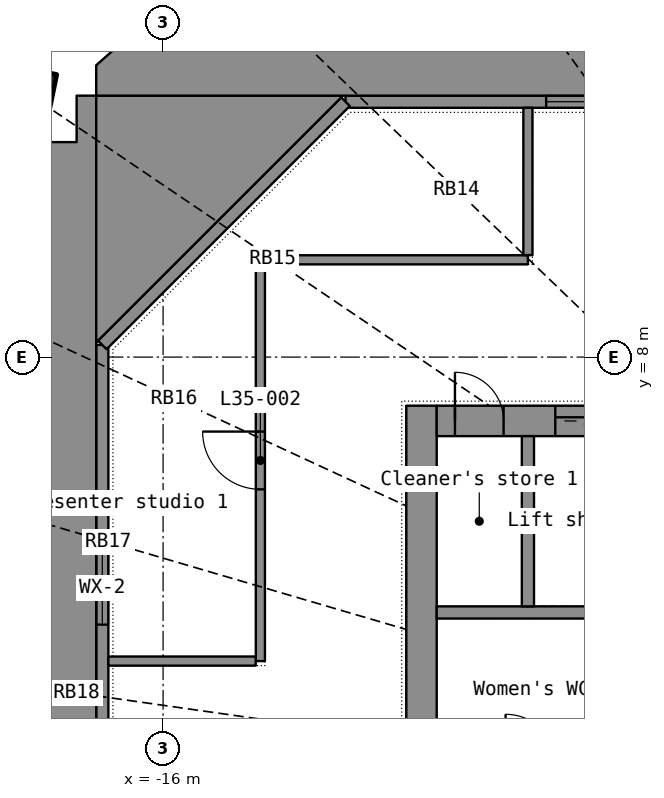
"""IFC4 building model, lengths in metres.
Left out: names, types, materials, properties, quantities, classifications, styles, units other than length and angle.
Written with IfcOpenShell. Run it as: python <this file> out.ifc"""

import sys

from ifc_helpers import new_model, si_unit, direction, frame, frame_2d, origin, origin_2d, place, context, subcontext, project, spatial, polyline, rectangle, hollow_rectangle, outline, extrude, element, fill, save


model = new_model("IFC4")
c1 = context("Model", 3, precision=1e-05, world=origin(), true_north=direction((0.0, 1.0)))
c2 = subcontext(c1, "Body", "Model", "MODEL_VIEW")
j1 = project(units=[si_unit("LENGTHUNIT", "METRE"), si_unit("PLANEANGLEUNIT", "RADIAN")], contexts=[c1])
p1 = place(None, origin())
s1 = spatial("IfcSite", under=j1, at=p1, CompositionType="ELEMENT")
p2 = place(p1, origin())
s2 = spatial("IfcBuilding", under=s1, at=p2, CompositionType="ELEMENT")
p3 = place(p2, frame((0.0, 0.0, 145.2)))
s3 = spatial("IfcBuildingStorey", under=s2, at=p3, CompositionType="ELEMENT", Elevation=145.2)
p4 = place(p3, frame((-18.222, 12.336, 0.0), z_axis=(0.026511305, -0.018201791, 0.999482789), x_axis=(0.720044306, 0.693898, -0.00646247)))
e1 = element("IfcColumn", 1, at=p4, inside=s3, PredefinedType="COLUMN", context=c2, shape_type="SweptSolid", body=[
    extrude(hollow_rectangle(XDim=0.8, YDim=0.8, WallThickness=0.025, at=origin_2d()), origin(), (0.0, 0.0, 1.0), 7.404),
])
p5 = place(p3, frame((-13.0, 12.2, 0.08), z_axis=(0.0, 0.0, 1.0), x_axis=(1.0, 0.0, 0.0)))
e2 = element("IfcWall", 2, at=p5, inside=s3, PredefinedType="STANDARD", context=c2, shape_type="SweptSolid", body=[
    extrude(rectangle(XDim=26.0, YDim=0.2, at=frame_2d((13.0, 0.0))), origin(), (0.0, 0.0, 1.0), 7.12),
])
p6 = place(p5, frame((7.1, 0.0, 0.0)))
e3 = element("IfcOpeningElement", 3, at=p6, cuts=e2, PredefinedType="OPENING", context=c2, shape_type="SweptSolid", body=[
    extrude(rectangle(XDim=1.8, YDim=2.4, at=frame_2d((0.9, 1.2))), frame((0.0, 0.11, 0.0), z_axis=(0.0, -1.0, 0.0), x_axis=(1.0, 0.0, 0.0)), (0.0, 0.0, 1.0), 0.22),
])
p7 = place(p5, frame((17.1, 0.0, 0.0)))
e4 = element("IfcOpeningElement", 4, at=p7, cuts=e2, PredefinedType="OPENING", context=c2, shape_type="SweptSolid", body=[
    extrude(rectangle(XDim=1.8, YDim=2.4, at=frame_2d((0.9, 1.2))), frame((0.0, 0.11, 0.0), z_axis=(0.0, -1.0, 0.0), x_axis=(1.0, 0.0, 0.0)), (0.0, 0.0, 1.0), 0.22),
])
p8 = place(p5, frame((3.3, 0.0, 0.9)))
e5 = element("IfcOpeningElement", 5, at=p8, cuts=e2, PredefinedType="OPENING", context=c2, shape_type="SweptSolid", body=[
    extrude(rectangle(XDim=2.4, YDim=1.5, at=frame_2d((1.2, 0.75))), frame((0.0, 0.11, 0.0), z_axis=(0.0, -1.0, 0.0), x_axis=(1.0, 0.0, 0.0)), (0.0, 0.0, 1.0), 0.22),
])
p9 = place(p5, frame((11.8, 0.0, 0.9)))
e6 = element("IfcOpeningElement", 6, at=p9, cuts=e2, PredefinedType="OPENING", context=c2, shape_type="SweptSolid", body=[
    extrude(rectangle(XDim=2.4, YDim=1.5, at=frame_2d((1.2, 0.75))), frame((0.0, 0.11, 0.0), z_axis=(0.0, -1.0, 0.0), x_axis=(1.0, 0.0, 0.0)), (0.0, 0.0, 1.0), 0.22),
])
p10 = place(p5, frame((20.3, 0.0, 0.9)))
e7 = element("IfcOpeningElement", 7, at=p10, cuts=e2, PredefinedType="OPENING", context=c2, shape_type="SweptSolid", body=[
    extrude(rectangle(XDim=2.4, YDim=1.5, at=frame_2d((1.2, 0.75))), frame((0.0, 0.11, 0.0), z_axis=(0.0, -1.0, 0.0), x_axis=(1.0, 0.0, 0.0)), (0.0, 0.0, 1.0), 0.22),
])
p11 = place(p5, frame((6.5, 0.0, 3.2)))
e8 = element("IfcOpeningElement", 8, at=p11, cuts=e2, PredefinedType="OPENING", context=c2, shape_type="SweptSolid", body=[
    extrude(rectangle(XDim=3.0, YDim=1.0, at=frame_2d((1.5, 0.5))), frame((0.0, 0.11, 0.0), z_axis=(0.0, -1.0, 0.0), x_axis=(1.0, 0.0, 0.0)), (0.0, 0.0, 1.0), 0.22),
])
p12 = place(p5, frame((16.5, 0.0, 3.2)))
e9 = element("IfcOpeningElement", 9, at=p12, cuts=e2, PredefinedType="OPENING", context=c2, shape_type="SweptSolid", body=[
    extrude(rectangle(XDim=3.0, YDim=1.0, at=frame_2d((1.5, 0.5))), frame((0.0, 0.11, 0.0), z_axis=(0.0, -1.0, 0.0), x_axis=(1.0, 0.0, 0.0)), (0.0, 0.0, 1.0), 0.22),
])
p13 = place(p3, frame((-17.0, -8.2, 0.08), z_axis=(0.0, 0.0, 1.0), x_axis=(0.0, 1.0, 0.0)))
e10 = element("IfcWall", 10, at=p13, inside=s3, PredefinedType="STANDARD", context=c2, shape_type="SweptSolid", body=[
    extrude(rectangle(XDim=16.4, YDim=0.2, at=frame_2d((8.2, 0.0))), origin(), (0.0, 0.0, 1.0), 7.12),
])
p14 = place(p13, frame((7.3, 0.0, 0.0)))
e11 = element("IfcOpeningElement", 11, at=p14, cuts=e10, PredefinedType="OPENING", context=c2, shape_type="SweptSolid", body=[
    extrude(rectangle(XDim=1.8, YDim=2.4, at=frame_2d((0.9, 1.2))), frame((0.0, 0.11, 0.0), z_axis=(0.0, -1.0, 0.0), x_axis=(1.0, 0.0, 0.0)), (0.0, 0.0, 1.0), 0.22),
])
p15 = place(p13, frame((3.4, 0.0, 0.1)))
e12 = element("IfcOpeningElement", 12, at=p15, cuts=e10, PredefinedType="OPENING", context=c2, shape_type="SweptSolid", body=[
    extrude(rectangle(XDim=1.2, YDim=2.2, at=frame_2d((0.6, 1.1))), frame((0.0, 0.11, 0.0), z_axis=(0.0, -1.0, 0.0), x_axis=(1.0, 0.0, 0.0)), (0.0, 0.0, 1.0), 0.22),
])
p16 = place(p13, frame((11.8, 0.0, 0.1)))
e13 = element("IfcOpeningElement", 13, at=p16, cuts=e10, PredefinedType="OPENING", context=c2, shape_type="SweptSolid", body=[
    extrude(rectangle(XDim=1.2, YDim=2.2, at=frame_2d((0.6, 1.1))), frame((0.0, 0.11, 0.0), z_axis=(0.0, -1.0, 0.0), x_axis=(1.0, 0.0, 0.0)), (0.0, 0.0, 1.0), 0.22),
])
p17 = place(p3, frame((-17.0, 8.2, 0.08), z_axis=(0.0, 0.0, 1.0), x_axis=(0.707106781, 0.707106781, 0.0)))
e14 = element("IfcWall", 14, at=p17, inside=s3, PredefinedType="STANDARD", context=c2, shape_type="SweptSolid", body=[
    extrude(rectangle(XDim=5.657, YDim=0.2, at=frame_2d((2.828, 0.0))), origin(), (0.0, 0.0, 1.0), 7.12),
])
p18 = place(p3, frame((0.0, 0.0, -0.4)))
e15 = element("IfcWall", 15, at=p18, inside=s3, PredefinedType="ELEMENTEDWALL", context=c2, shape_type="SweptSolid", body=[
    extrude(outline(polyline([(-23.072, 2.519), (-23.214, 1.646), (-23.248, 1.025), (-22.392, 1.025), (-22.392, 0.9), (-17.1, 0.9), (-17.1, 8.241), (-17.1, 12.3), (-17.422, 12.3), (-17.422, 11.536), (-18.419, 11.536), (-19.088, 10.829), (-19.4, 10.432), (-19.308, 10.432), (-19.308, 8.382), (-20.86, 8.382), (-21.119, 7.979), (-21.507, 7.221), (-21.507, 5.744), (-22.175, 5.744), (-22.509, 4.886), (-22.719, 4.119), (-22.562, 4.119), (-22.562, 2.519), (-23.072, 2.519)])), origin(), (0.0, 0.0, 1.0), 1.58),
])
p19 = place(p3, frame((0.0, 0.0, -0.4)))
e16 = element("IfcWall", 16, at=p19, inside=s3, PredefinedType="ELEMENTEDWALL", context=c2, shape_type="SweptSolid", body=[
    extrude(outline(polyline([(-13.042, 12.3), (-17.1, 12.3), (-17.1, 8.241), (-13.042, 12.3)])), origin(), (0.0, 0.0, 1.0), 1.58),
])
p20 = place(p3, frame((0.0, 0.0, -0.4)))
e17 = element("IfcWall", 17, at=p20, inside=s3, PredefinedType="ELEMENTEDWALL", context=c2, shape_type="SweptSolid", body=[
    extrude(outline(polyline([(-17.1, 12.8), (-17.1, 12.3), (-13.042, 12.3), (-5.9, 12.3), (-5.9, 18.26), (-6.031, 18.236), (-7.357, 17.898), (-7.357, 17.304), (-8.957, 17.304), (-8.957, 17.41), (-9.848, 17.111), (-10.763, 16.725), (-10.763, 15.372), (-12.813, 15.372), (-12.813, 15.75), (-13.366, 15.465), (-14.506, 14.757), (-14.506, 13.924), (-15.704, 13.924), (-16.478, 13.35), (-17.1, 12.8)])), origin(), (0.0, 0.0, 1.0), 1.58),
])
p21 = place(p3, frame((-11.75, -7.2, 0.0), z_axis=(0.0, 0.0, 1.0), x_axis=(0.0, 1.0, 0.0)))
e18 = element("IfcWall", 18, at=p21, inside=s3, PredefinedType="SHEAR", context=c2, shape_type="SweptSolid", body=[
    extrude(rectangle(XDim=14.4, YDim=0.5, at=frame_2d((7.2, 0.0))), origin(), (0.0, 0.0, 1.0), 7.0),
])
p22 = place(p21, frame((6.5, 0.0, 0.0)))
e19 = element("IfcOpeningElement", 19, at=p22, cuts=e18, PredefinedType="OPENING", context=c2, shape_type="SweptSolid", body=[
    extrude(rectangle(XDim=1.4, YDim=2.2, at=frame_2d((0.7, 1.1))), frame((0.0, 0.26, 0.0), z_axis=(0.0, -1.0, 0.0), x_axis=(1.0, 0.0, 0.0)), (0.0, 0.0, 1.0), 0.52),
])
p23 = place(p3, frame((-11.5, 6.95, 0.0), z_axis=(0.0, 0.0, 1.0), x_axis=(1.0, 0.0, 0.0)))
e20 = element("IfcWall", 20, at=p23, inside=s3, PredefinedType="SHEAR", context=c2, shape_type="SweptSolid", body=[
    extrude(rectangle(XDim=23.0, YDim=0.5, at=frame_2d((11.5, 0.0))), origin(), (0.0, 0.0, 1.0), 7.0),
])
p24 = place(p23, frame((1.95, 0.0, 0.0)))
e21 = element("IfcOpeningElement", 21, at=p24, cuts=e20, PredefinedType="OPENING", context=c2, shape_type="SweptSolid", body=[
    extrude(rectangle(XDim=1.1, YDim=2.2, at=frame_2d((0.55, 1.1))), frame((0.0, 0.26, 0.0), z_axis=(0.0, -1.0, 0.0), x_axis=(1.0, 0.0, 0.0)), (0.0, 0.0, 1.0), 0.52),
])
p25 = place(p23, frame((3.95, 0.0, 0.0)))
e22 = element("IfcOpeningElement", 22, at=p25, cuts=e20, PredefinedType="OPENING", context=c2, shape_type="SweptSolid", body=[
    extrude(rectangle(XDim=1.1, YDim=2.2, at=frame_2d((0.55, 1.1))), frame((0.0, 0.26, 0.0), z_axis=(0.0, -1.0, 0.0), x_axis=(1.0, 0.0, 0.0)), (0.0, 0.0, 1.0), 0.52),
])
p26 = place(p23, frame((5.95, 0.0, 0.0)))
e23 = element("IfcOpeningElement", 23, at=p26, cuts=e20, PredefinedType="OPENING", context=c2, shape_type="SweptSolid", body=[
    extrude(rectangle(XDim=1.1, YDim=2.2, at=frame_2d((0.55, 1.1))), frame((0.0, 0.26, 0.0), z_axis=(0.0, -1.0, 0.0), x_axis=(1.0, 0.0, 0.0)), (0.0, 0.0, 1.0), 0.52),
])
p27 = place(p23, frame((7.95, 0.0, 0.0)))
e24 = element("IfcOpeningElement", 24, at=p27, cuts=e20, PredefinedType="OPENING", context=c2, shape_type="SweptSolid", body=[
    extrude(rectangle(XDim=1.1, YDim=2.2, at=frame_2d((0.55, 1.1))), frame((0.0, 0.26, 0.0), z_axis=(0.0, -1.0, 0.0), x_axis=(1.0, 0.0, 0.0)), (0.0, 0.0, 1.0), 0.52),
])
p28 = place(p23, frame((9.95, 0.0, 0.0)))
e25 = element("IfcOpeningElement", 25, at=p28, cuts=e20, PredefinedType="OPENING", context=c2, shape_type="SweptSolid", body=[
    extrude(rectangle(XDim=1.1, YDim=2.2, at=frame_2d((0.55, 1.1))), frame((0.0, 0.26, 0.0), z_axis=(0.0, -1.0, 0.0), x_axis=(1.0, 0.0, 0.0)), (0.0, 0.0, 1.0), 0.52),
])
p29 = place(p23, frame((11.95, 0.0, 0.0)))
e26 = element("IfcOpeningElement", 26, at=p29, cuts=e20, PredefinedType="OPENING", context=c2, shape_type="SweptSolid", body=[
    extrude(rectangle(XDim=1.1, YDim=2.2, at=frame_2d((0.55, 1.1))), frame((0.0, 0.26, 0.0), z_axis=(0.0, -1.0, 0.0), x_axis=(1.0, 0.0, 0.0)), (0.0, 0.0, 1.0), 0.52),
])
p30 = place(p23, frame((13.95, 0.0, 0.0)))
e27 = element("IfcOpeningElement", 27, at=p30, cuts=e20, PredefinedType="OPENING", context=c2, shape_type="SweptSolid", body=[
    extrude(rectangle(XDim=1.1, YDim=2.2, at=frame_2d((0.55, 1.1))), frame((0.0, 0.26, 0.0), z_axis=(0.0, -1.0, 0.0), x_axis=(1.0, 0.0, 0.0)), (0.0, 0.0, 1.0), 0.52),
])
p31 = place(p23, frame((15.95, 0.0, 0.0)))
e28 = element("IfcOpeningElement", 28, at=p31, cuts=e20, PredefinedType="OPENING", context=c2, shape_type="SweptSolid", body=[
    extrude(rectangle(XDim=1.1, YDim=2.2, at=frame_2d((0.55, 1.1))), frame((0.0, 0.26, 0.0), z_axis=(0.0, -1.0, 0.0), x_axis=(1.0, 0.0, 0.0)), (0.0, 0.0, 1.0), 0.52),
])
p32 = place(p23, frame((17.95, 0.0, 0.0)))
e29 = element("IfcOpeningElement", 29, at=p32, cuts=e20, PredefinedType="OPENING", context=c2, shape_type="SweptSolid", body=[
    extrude(rectangle(XDim=1.1, YDim=2.2, at=frame_2d((0.55, 1.1))), frame((0.0, 0.26, 0.0), z_axis=(0.0, -1.0, 0.0), x_axis=(1.0, 0.0, 0.0)), (0.0, 0.0, 1.0), 0.52),
])
p33 = place(p23, frame((19.95, 0.0, 0.0)))
e30 = element("IfcOpeningElement", 30, at=p33, cuts=e20, PredefinedType="OPENING", context=c2, shape_type="SweptSolid", body=[
    extrude(rectangle(XDim=1.1, YDim=2.2, at=frame_2d((0.55, 1.1))), frame((0.0, 0.26, 0.0), z_axis=(0.0, -1.0, 0.0), x_axis=(1.0, 0.0, 0.0)), (0.0, 0.0, 1.0), 0.52),
])
p34 = place(p23, frame((0.3, 0.0, 0.0)))
e31 = element("IfcOpeningElement", 31, at=p34, cuts=e20, PredefinedType="OPENING", context=c2, shape_type="SweptSolid", body=[
    extrude(rectangle(XDim=0.8, YDim=2.05, at=frame_2d((0.4, 1.025))), frame((0.0, 0.26, 0.0), z_axis=(0.0, -1.0, 0.0), x_axis=(1.0, 0.0, 0.0)), (0.0, 0.0, 1.0), 0.52),
])
p35 = place(p23, frame((21.9, 0.0, 0.0)))
e32 = element("IfcOpeningElement", 32, at=p35, cuts=e20, PredefinedType="OPENING", context=c2, shape_type="SweptSolid", body=[
    extrude(rectangle(XDim=0.8, YDim=2.05, at=frame_2d((0.4, 1.025))), frame((0.0, 0.26, 0.0), z_axis=(0.0, -1.0, 0.0), x_axis=(1.0, 0.0, 0.0)), (0.0, 0.0, 1.0), 0.52),
])
p36 = place(p3, frame((-11.5, 3.8, 0.0), z_axis=(0.0, 0.0, 1.0), x_axis=(1.0, 0.0, 0.0)))
e33 = element("IfcWall", 33, at=p36, inside=s3, PredefinedType="SHEAR", context=c2, shape_type="SweptSolid", body=[
    extrude(rectangle(XDim=23.0, YDim=0.2, at=frame_2d((11.5, 0.0))), origin(), (0.0, 0.0, 1.0), 7.0),
])
p37 = place(p3, frame((-10.0, 3.9, 0.0), z_axis=(0.0, 0.0, 1.0), x_axis=(0.0, 1.0, 0.0)))
e34 = element("IfcWall", 34, at=p37, inside=s3, PredefinedType="SHEAR", context=c2, shape_type="SweptSolid", body=[
    extrude(rectangle(XDim=2.8, YDim=0.2, at=frame_2d((1.4, 0.0))), origin(), (0.0, 0.0, 1.0), 7.0),
])
p38 = place(p3, frame((-14.4, 3.0, 0.0), z_axis=(0.0, 0.0, 1.0), x_axis=(0.0, 1.0, 0.0)))
e35 = element("IfcWall", 35, at=p38, inside=s3, PredefinedType="PARTITIONING", context=c2, shape_type="SweptSolid", body=[
    extrude(rectangle(XDim=6.6, YDim=0.15, at=frame_2d((3.3, 0.0))), origin(), (0.0, 0.0, 1.0), 6.1),
])
p39 = place(p38, frame((2.825, 0.0, 0.0)))
e36 = element("IfcOpeningElement", 36, at=p39, cuts=e35, PredefinedType="OPENING", context=c2, shape_type="SweptSolid", body=[
    extrude(rectangle(XDim=0.95, YDim=2.15, at=frame_2d((0.475, 1.075))), frame((0.0, 0.085, 0.0), z_axis=(0.0, -1.0, 0.0), x_axis=(1.0, 0.0, 0.0)), (0.0, 0.0, 1.0), 0.17),
])
p40 = place(p3, frame((-14.323, 9.6, 0.0), z_axis=(0.0, 0.0, 1.0), x_axis=(1.0, 0.0, 0.0)))
e37 = element("IfcWall", 37, at=p40, inside=s3, PredefinedType="PARTITIONING", context=c2, shape_type="SweptSolid", body=[
    extrude(rectangle(XDim=4.323, YDim=0.15, at=frame_2d((2.162, 0.0))), origin(), (0.0, 0.0, 1.0), 6.1),
])
p41 = place(p3, frame((-10.0, 9.677, 0.0), z_axis=(0.0, 0.0, 1.0), x_axis=(0.0, 1.0, 0.0)))
e38 = element("IfcWall", 38, at=p41, inside=s3, PredefinedType="PARTITIONING", context=c2, shape_type="SweptSolid", body=[
    extrude(rectangle(XDim=2.423, YDim=0.15, at=frame_2d((1.211, 0.0))), origin(), (0.0, 0.0, 1.0), 6.1),
])
p42 = place(p3, frame((-16.9, 3.0, 0.0), z_axis=(0.0, 0.0, 1.0), x_axis=(1.0, 0.0, 0.0)))
e39 = element("IfcWall", 39, at=p42, inside=s3, PredefinedType="PARTITIONING", context=c2, shape_type="SweptSolid", body=[
    extrude(rectangle(XDim=2.423, YDim=0.15, at=frame_2d((1.211, 0.0))), origin(), (0.0, 0.0, 1.0), 6.1),
])
p43 = place(p8, origin())
e40 = element("IfcWindow", 40, at=p43, inside=s3, PartitioningType="SINGLE_PANEL", PredefinedType="WINDOW", context=c2, shape_type="SweptSolid", body=[
    extrude(rectangle(XDim=2.4, YDim=1.5, at=frame_2d((1.2, 0.75))), frame((0.0, 0.03, 0.0), z_axis=(0.0, -1.0, 0.0), x_axis=(1.0, 0.0, 0.0)), (0.0, 0.0, 1.0), 0.06),
])
fill(e5, e40)
p44 = place(p16, origin())
e41 = element("IfcWindow", 41, at=p44, inside=s3, PartitioningType="SINGLE_PANEL", PredefinedType="WINDOW", context=c2, shape_type="SweptSolid", body=[
    extrude(rectangle(XDim=1.2, YDim=2.2, at=frame_2d((0.6, 1.1))), frame((0.0, 0.03, 0.0), z_axis=(0.0, -1.0, 0.0), x_axis=(1.0, 0.0, 0.0)), (0.0, 0.0, 1.0), 0.06),
])
fill(e13, e41)
p45 = place(p24, origin())
e42 = element("IfcDoor", 42, at=p45, inside=s3, OperationType="DOUBLE_DOOR_SLIDING", PredefinedType="DOOR", context=c2, shape_type="SweptSolid", body=[
    extrude(rectangle(XDim=1.1, YDim=2.2, at=frame_2d((0.55, 1.1))), frame((0.0, 0.025, 0.0), z_axis=(0.0, -1.0, 0.0), x_axis=(1.0, 0.0, 0.0)), (0.0, 0.0, 1.0), 0.05),
])
fill(e21, e42)
p46 = place(p34, origin())
e43 = element("IfcDoor", 43, at=p46, inside=s3, OperationType="SINGLE_SWING_LEFT", PredefinedType="DOOR", context=c2, shape_type="SweptSolid", body=[
    extrude(rectangle(XDim=0.8, YDim=2.05, at=frame_2d((0.4, 1.025))), frame((0.0, 0.025, 0.0), z_axis=(0.0, -1.0, 0.0), x_axis=(1.0, 0.0, 0.0)), (0.0, 0.0, 1.0), 0.05),
])
fill(e31, e43)
p47 = place(p39, origin())
e44 = element("IfcDoor", 44, at=p47, inside=s3, OperationType="SINGLE_SWING_RIGHT", PredefinedType="DOOR", context=c2, shape_type="SweptSolid", body=[
    extrude(rectangle(XDim=0.95, YDim=2.15, at=frame_2d((0.475, 1.075))), frame((0.0, 0.025, 0.0), z_axis=(0.0, -1.0, 0.0), x_axis=(1.0, 0.0, 0.0)), (0.0, 0.0, 1.0), 0.05),
])
fill(e36, e44)
save(model, sys.argv[1])
